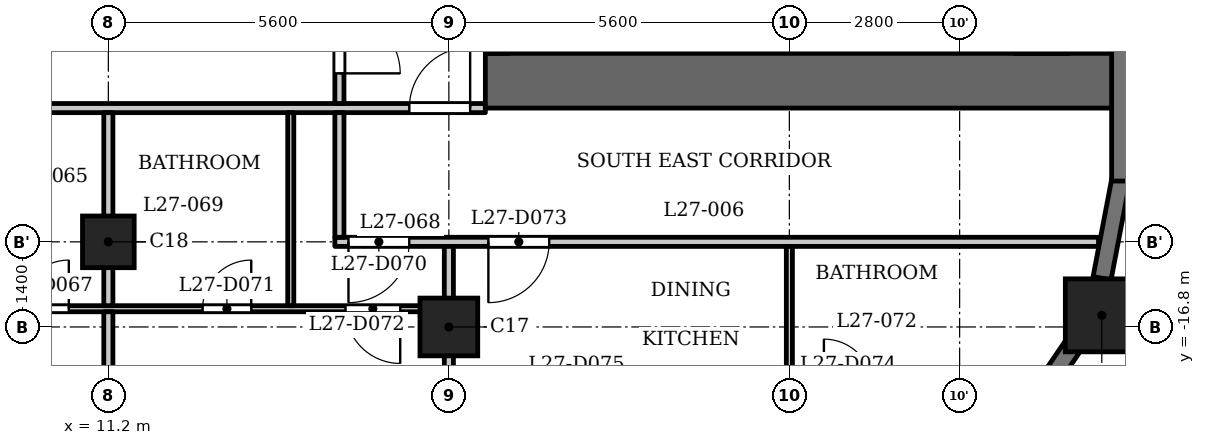
"""IFC4 building model, lengths in metres.
Left out: names, types, materials, properties, quantities, classifications, styles, units other than length and angle.
Written with IfcOpenShell. Run it as: python <this file> out.ifc"""

import sys

from ifc_helpers import new_model, si_unit, direction, frame, frame_2d, origin, origin_2d, place, context, subcontext, project, spatial, rectangle, extrude, element, fill, save


model = new_model("IFC4")
c1 = context("Model", 3, precision=1e-05, world=origin(), true_north=direction((0.0, 1.0)))
c2 = subcontext(c1, "Body", "Model", "MODEL_VIEW")
j1 = project(units=[si_unit("LENGTHUNIT", "METRE"), si_unit("PLANEANGLEUNIT", "RADIAN")], contexts=[c1])
p1 = place(None, origin())
s1 = spatial("IfcSite", under=j1, at=p1, CompositionType="ELEMENT")
p2 = place(p1, origin())
s2 = spatial("IfcBuilding", under=s1, at=p2, CompositionType="ELEMENT")
p3 = place(p2, frame((0.0, 0.0, 107.8)))
s3 = spatial("IfcBuildingStorey", under=s2, at=p3, CompositionType="ELEMENT", Elevation=107.8)
p4 = place(p3, frame((27.538, -16.609, 0.0), z_axis=(0.0, 0.0, 1.0), x_axis=(1.0, 0.0, 0.0)))
e1 = element("IfcColumn", 1, at=p4, inside=s3, PredefinedType="COLUMN", context=c2, shape_type="SweptSolid", body=[
    extrude(rectangle(XDim=1.2, YDim=1.2, at=origin_2d()), origin(), (0.0, 0.0, 1.0), 3.5),
])
p5 = place(p3, frame((16.8, -16.8, 0.0), z_axis=(0.0, 0.0, 1.0), x_axis=(1.0, 0.0, 0.0)))
e2 = element("IfcColumn", 2, at=p5, inside=s3, PredefinedType="COLUMN", context=c2, shape_type="SweptSolid", body=[
    extrude(rectangle(XDim=0.95, YDim=0.95, at=origin_2d()), origin(), (0.0, 0.0, 1.0), 3.5),
])
p6 = place(p3, frame((11.2, -15.4, 0.0), z_axis=(0.0, 0.0, 1.0), x_axis=(1.0, 0.0, 0.0)))
e3 = element("IfcColumn", 3, at=p6, inside=s3, PredefinedType="COLUMN", context=c2, shape_type="SweptSolid", body=[
    extrude(rectangle(XDim=0.85, YDim=0.85, at=origin_2d()), origin(), (0.0, 0.0, 1.0), 3.5),
])
p7 = place(p3, frame((26.561, -17.851, 0.0), z_axis=(0.0, 0.0, 1.0), x_axis=(0.562173331661, 0.827019434577, 0.0)))
e4 = element("IfcWall", 4, at=p7, inside=s3, PredefinedType="SOLIDWALL", context=c2, shape_type="SweptSolid", body=[
    extrude(rectangle(XDim=0.977, YDim=0.3, at=frame_2d((0.489, 0.0))), origin(), (0.0, 0.0, 1.0), 3.2),
])
p8 = place(p3, frame((27.542, -15.999, 0.0), z_axis=(0.0, 0.0, 1.0), x_axis=(0.187349172861, 0.982293381546, 0.0)))
e5 = element("IfcWall", 5, at=p8, inside=s3, PredefinedType="SOLIDWALL", context=c2, shape_type="SweptSolid", body=[
    extrude(rectangle(XDim=1.656, YDim=0.3, at=frame_2d((0.828, 0.0))), origin(), (0.0, 0.0, 1.0), 2.4),
])
p9 = place(p3, frame((27.85, -14.4, 0.0), z_axis=(0.0, 0.0, 1.0), x_axis=(0.0, 1.0, 0.0)))
e6 = element("IfcWall", 6, at=p9, inside=s3, PredefinedType="SOLIDWALL", context=c2, shape_type="SweptSolid", body=[
    extrude(rectangle(XDim=2.6, YDim=0.3, at=frame_2d((1.3, 0.0))), origin(), (0.0, 0.0, 1.0), 2.4),
])
p10 = place(p3, frame((17.4, -12.75, 0.0), z_axis=(0.0, 0.0, 1.0), x_axis=(1.0, 0.0, 0.0)))
e7 = element("IfcWall", 7, at=p10, inside=s3, PredefinedType="SHEAR", context=c2, shape_type="SweptSolid", body=[
    extrude(rectangle(XDim=10.4, YDim=0.9, at=frame_2d((5.2, 0.0))), origin(), (0.0, 0.0, 1.0), 3.2),
])
p11 = place(p3, frame((17.6, -12.3, 0.0), z_axis=(0.0, 0.0, 1.0), x_axis=(0.0, 1.0, 0.0)))
e8 = element("IfcWall", 8, at=p11, inside=s3, PredefinedType="SHEAR", context=c2, shape_type="SweptSolid", body=[
    extrude(rectangle(XDim=24.6, YDim=0.4, at=frame_2d((12.3, 0.0))), origin(), (0.0, 0.0, 1.0), 3.2),
])
p12 = place(p11, frame((6.0, 0.0, 0.0)))
e9 = element("IfcOpeningElement", 9, at=p12, cuts=e8, PredefinedType="OPENING", context=c2, shape_type="SweptSolid", body=[
    extrude(rectangle(XDim=1.1, YDim=2.1, at=frame_2d((0.55, 1.05))), frame((0.0, 0.21, 0.0), z_axis=(0.0, -1.0, 0.0), x_axis=(1.0, 0.0, 0.0)), (0.0, 0.0, 1.0), 0.42),
])
p13 = place(p11, frame((8.4, 0.0, 0.0)))
e10 = element("IfcOpeningElement", 10, at=p13, cuts=e8, PredefinedType="OPENING", context=c2, shape_type="SweptSolid", body=[
    extrude(rectangle(XDim=1.1, YDim=2.1, at=frame_2d((0.55, 1.05))), frame((0.0, 0.21, 0.0), z_axis=(0.0, -1.0, 0.0), x_axis=(1.0, 0.0, 0.0)), (0.0, 0.0, 1.0), 0.42),
])
p14 = place(p11, frame((10.8, 0.0, 0.0)))
e11 = element("IfcOpeningElement", 11, at=p14, cuts=e8, PredefinedType="OPENING", context=c2, shape_type="SweptSolid", body=[
    extrude(rectangle(XDim=1.1, YDim=2.1, at=frame_2d((0.55, 1.05))), frame((0.0, 0.21, 0.0), z_axis=(0.0, -1.0, 0.0), x_axis=(1.0, 0.0, 0.0)), (0.0, 0.0, 1.0), 0.42),
])
p15 = place(p11, frame((16.75, 0.0, 0.0)))
e12 = element("IfcOpeningElement", 12, at=p15, cuts=e8, PredefinedType="OPENING", context=c2, shape_type="SweptSolid", body=[
    extrude(rectangle(XDim=0.9, YDim=2.1, at=frame_2d((0.45, 1.05))), frame((0.0, 0.21, 0.0), z_axis=(0.0, -1.0, 0.0), x_axis=(1.0, 0.0, 0.0)), (0.0, 0.0, 1.0), 0.42),
])
p16 = place(p11, frame((22.8, 0.0, 0.0)))
e13 = element("IfcOpeningElement", 13, at=p16, cuts=e8, PredefinedType="OPENING", context=c2, shape_type="SweptSolid", body=[
    extrude(rectangle(XDim=1.1, YDim=2.1, at=frame_2d((0.55, 1.05))), frame((0.0, 0.21, 0.0), z_axis=(0.0, -1.0, 0.0), x_axis=(1.0, 0.0, 0.0)), (0.0, 0.0, 1.0), 0.42),
])
p17 = place(p11, frame((0.7, 0.0, 0.0)))
e14 = element("IfcOpeningElement", 14, at=p17, cuts=e8, PredefinedType="OPENING", context=c2, shape_type="SweptSolid", body=[
    extrude(rectangle(XDim=1.1, YDim=2.1, at=frame_2d((0.55, 1.05))), frame((0.0, 0.21, 0.0), z_axis=(0.0, -1.0, 0.0), x_axis=(1.0, 0.0, 0.0)), (0.0, 0.0, 1.0), 0.42),
])
p18 = place(p11, frame((12.775, 0.0, 0.0)))
e15 = element("IfcOpeningElement", 15, at=p18, cuts=e8, PredefinedType="OPENING", context=c2, shape_type="SweptSolid", body=[
    extrude(rectangle(XDim=1.8, YDim=2.1, at=frame_2d((0.9, 1.05))), frame((0.0, 0.21, 0.0), z_axis=(0.0, -1.0, 0.0), x_axis=(1.0, 0.0, 0.0)), (0.0, 0.0, 1.0), 0.42),
])
p19 = place(p3, frame((26.55, -12.3, 0.0), z_axis=(0.0, 0.0, 1.0), x_axis=(0.0, 1.0, 0.0)))
e16 = element("IfcWall", 16, at=p19, inside=s3, PredefinedType="SHEAR", context=c2, shape_type="SweptSolid", body=[
    extrude(rectangle(XDim=24.6, YDim=0.9, at=frame_2d((12.3, 0.0))), origin(), (0.0, 0.0, 1.0), 3.2),
])
p20 = place(p3, frame((23.55, -12.3, 0.0), z_axis=(0.0, 0.0, 1.0), x_axis=(0.0, 1.0, 0.0)))
e17 = element("IfcWall", 17, at=p20, inside=s3, PredefinedType="PARTITIONING", context=c2, shape_type="SweptSolid", body=[
    extrude(rectangle(XDim=2.5, YDim=0.2, at=frame_2d((1.25, 0.0))), origin(), (0.0, 0.0, 1.0), 3.2),
])
p21 = place(p20, frame((0.8, 0.0, 0.0)))
e18 = element("IfcOpeningElement", 18, at=p21, cuts=e17, PredefinedType="OPENING", context=c2, shape_type="SweptSolid", body=[
    extrude(rectangle(XDim=0.9, YDim=2.1, at=frame_2d((0.45, 1.05))), frame((0.0, 0.11, 0.0), z_axis=(0.0, -1.0, 0.0), x_axis=(1.0, 0.0, 0.0)), (0.0, 0.0, 1.0), 0.22),
])
p22 = place(p3, frame((-16.725, -16.5, 0.0), z_axis=(0.0, 0.0, 1.0), x_axis=(1.0, 0.0, 0.0)))
e19 = element("IfcWall", 19, at=p22, inside=s3, PredefinedType="PARTITIONING", context=c2, shape_type="SweptSolid", body=[
    extrude(rectangle(XDim=33.45, YDim=0.1, at=frame_2d((16.725, 0.0))), origin(), (0.0, 0.0, 1.0), 3.2),
])
p23 = place(p22, frame((4.075, 0.0, 0.0)))
e20 = element("IfcOpeningElement", 20, at=p23, cuts=e19, PredefinedType="OPENING", context=c2, shape_type="SweptSolid", body=[
    extrude(rectangle(XDim=0.8, YDim=2.1, at=frame_2d((0.4, 1.05))), frame((0.0, 0.06, 0.0), z_axis=(0.0, -1.0, 0.0), x_axis=(1.0, 0.0, 0.0)), (0.0, 0.0, 1.0), 0.12),
])
p24 = place(p22, frame((1.075, 0.0, 0.0)))
e21 = element("IfcOpeningElement", 21, at=p24, cuts=e19, PredefinedType="OPENING", context=c2, shape_type="SweptSolid", body=[
    extrude(rectangle(XDim=0.9, YDim=2.1, at=frame_2d((0.45, 1.05))), frame((0.0, 0.06, 0.0), z_axis=(0.0, -1.0, 0.0), x_axis=(1.0, 0.0, 0.0)), (0.0, 0.0, 1.0), 0.12),
])
p25 = place(p22, frame((9.675, 0.0, 0.0)))
e22 = element("IfcOpeningElement", 22, at=p25, cuts=e19, PredefinedType="OPENING", context=c2, shape_type="SweptSolid", body=[
    extrude(rectangle(XDim=0.8, YDim=2.1, at=frame_2d((0.4, 1.05))), frame((0.0, 0.06, 0.0), z_axis=(0.0, -1.0, 0.0), x_axis=(1.0, 0.0, 0.0)), (0.0, 0.0, 1.0), 0.12),
])
p26 = place(p22, frame((7.675, 0.0, 0.0)))
e23 = element("IfcOpeningElement", 23, at=p26, cuts=e19, PredefinedType="OPENING", context=c2, shape_type="SweptSolid", body=[
    extrude(rectangle(XDim=0.9, YDim=2.1, at=frame_2d((0.45, 1.05))), frame((0.0, 0.06, 0.0), z_axis=(0.0, -1.0, 0.0), x_axis=(1.0, 0.0, 0.0)), (0.0, 0.0, 1.0), 0.12),
])
p27 = place(p22, frame((15.275, 0.0, 0.0)))
e24 = element("IfcOpeningElement", 24, at=p27, cuts=e19, PredefinedType="OPENING", context=c2, shape_type="SweptSolid", body=[
    extrude(rectangle(XDim=0.8, YDim=2.1, at=frame_2d((0.4, 1.05))), frame((0.0, 0.06, 0.0), z_axis=(0.0, -1.0, 0.0), x_axis=(1.0, 0.0, 0.0)), (0.0, 0.0, 1.0), 0.12),
])
p28 = place(p22, frame((11.775, 0.0, 0.0)))
e25 = element("IfcOpeningElement", 25, at=p28, cuts=e19, PredefinedType="OPENING", context=c2, shape_type="SweptSolid", body=[
    extrude(rectangle(XDim=0.9, YDim=2.1, at=frame_2d((0.45, 1.05))), frame((0.0, 0.06, 0.0), z_axis=(0.0, -1.0, 0.0), x_axis=(1.0, 0.0, 0.0)), (0.0, 0.0, 1.0), 0.12),
])
p29 = place(p22, frame((20.625, 0.0, 0.0)))
e26 = element("IfcOpeningElement", 26, at=p29, cuts=e19, PredefinedType="OPENING", context=c2, shape_type="SweptSolid", body=[
    extrude(rectangle(XDim=0.8, YDim=2.1, at=frame_2d((0.4, 1.05))), frame((0.0, 0.06, 0.0), z_axis=(0.0, -1.0, 0.0), x_axis=(1.0, 0.0, 0.0)), (0.0, 0.0, 1.0), 0.12),
])
p30 = place(p22, frame((18.375, 0.0, 0.0)))
e27 = element("IfcOpeningElement", 27, at=p30, cuts=e19, PredefinedType="OPENING", context=c2, shape_type="SweptSolid", body=[
    extrude(rectangle(XDim=0.9, YDim=2.1, at=frame_2d((0.45, 1.05))), frame((0.0, 0.06, 0.0), z_axis=(0.0, -1.0, 0.0), x_axis=(1.0, 0.0, 0.0)), (0.0, 0.0, 1.0), 0.12),
])
p31 = place(p22, frame((26.475, 0.0, 0.0)))
e28 = element("IfcOpeningElement", 28, at=p31, cuts=e19, PredefinedType="OPENING", context=c2, shape_type="SweptSolid", body=[
    extrude(rectangle(XDim=0.8, YDim=2.1, at=frame_2d((0.4, 1.05))), frame((0.0, 0.06, 0.0), z_axis=(0.0, -1.0, 0.0), x_axis=(1.0, 0.0, 0.0)), (0.0, 0.0, 1.0), 0.12),
])
p32 = place(p22, frame((23.225, 0.0, 0.0)))
e29 = element("IfcOpeningElement", 29, at=p32, cuts=e19, PredefinedType="OPENING", context=c2, shape_type="SweptSolid", body=[
    extrude(rectangle(XDim=0.9, YDim=2.1, at=frame_2d((0.45, 1.05))), frame((0.0, 0.06, 0.0), z_axis=(0.0, -1.0, 0.0), x_axis=(1.0, 0.0, 0.0)), (0.0, 0.0, 1.0), 0.12),
])
p33 = place(p22, frame((29.475, 0.0, 0.0)))
e30 = element("IfcOpeningElement", 30, at=p33, cuts=e19, PredefinedType="OPENING", context=c2, shape_type="SweptSolid", body=[
    extrude(rectangle(XDim=0.8, YDim=2.1, at=frame_2d((0.4, 1.05))), frame((0.0, 0.06, 0.0), z_axis=(0.0, -1.0, 0.0), x_axis=(1.0, 0.0, 0.0)), (0.0, 0.0, 1.0), 0.12),
])
p34 = place(p22, frame((31.825, 0.0, 0.0)))
e31 = element("IfcOpeningElement", 31, at=p34, cuts=e19, PredefinedType="OPENING", context=c2, shape_type="SweptSolid", body=[
    extrude(rectangle(XDim=0.9, YDim=2.1, at=frame_2d((0.45, 1.05))), frame((0.0, 0.06, 0.0), z_axis=(0.0, -1.0, 0.0), x_axis=(1.0, 0.0, 0.0)), (0.0, 0.0, 1.0), 0.12),
])
p35 = place(p3, frame((14.925, -15.4, 0.0), z_axis=(0.0, 0.0, 1.0), x_axis=(1.0, 0.0, 0.0)))
e32 = element("IfcWall", 32, at=p35, inside=s3, PredefinedType="PARTITIONING", context=c2, shape_type="SweptSolid", body=[
    extrude(rectangle(XDim=12.559, YDim=0.15, at=frame_2d((6.279, 0.0))), origin(), (0.0, 0.0, 1.0), 3.2),
])
p36 = place(p35, frame((0.224, 0.0, 0.0)))
e33 = element("IfcOpeningElement", 33, at=p36, cuts=e32, PredefinedType="OPENING", context=c2, shape_type="SweptSolid", body=[
    extrude(rectangle(XDim=1.0, YDim=2.1, at=frame_2d((0.5, 1.05))), frame((0.0, 0.085, 0.0), z_axis=(0.0, -1.0, 0.0), x_axis=(1.0, 0.0, 0.0)), (0.0, 0.0, 1.0), 0.17),
])
p37 = place(p35, frame((2.525, 0.0, 0.0)))
e34 = element("IfcOpeningElement", 34, at=p37, cuts=e32, PredefinedType="OPENING", context=c2, shape_type="SweptSolid", body=[
    extrude(rectangle(XDim=1.0, YDim=2.1, at=frame_2d((0.5, 1.05))), frame((0.0, 0.085, 0.0), z_axis=(0.0, -1.0, 0.0), x_axis=(1.0, 0.0, 0.0)), (0.0, 0.0, 1.0), 0.17),
])
p38 = place(p3, frame((-17.4, -13.2, 0.0), z_axis=(0.0, 0.0, 1.0), x_axis=(1.0, 0.0, 0.0)))
e35 = element("IfcWall", 35, at=p38, inside=s3, PredefinedType="PARTITIONING", context=c2, shape_type="SweptSolid", body=[
    extrude(rectangle(XDim=34.8, YDim=0.15, at=frame_2d((17.4, 0.0))), origin(), (0.0, 0.0, 1.0), 3.2),
])
p39 = place(p38, frame((0.15, 0.0, 0.0)))
e36 = element("IfcOpeningElement", 36, at=p39, cuts=e35, PredefinedType="OPENING", context=c2, shape_type="SweptSolid", body=[
    extrude(rectangle(XDim=1.0, YDim=2.1, at=frame_2d((0.5, 1.05))), frame((0.0, 0.085, 0.0), z_axis=(0.0, -1.0, 0.0), x_axis=(1.0, 0.0, 0.0)), (0.0, 0.0, 1.0), 0.17),
])
p40 = place(p38, frame((33.55, 0.0, 0.0)))
e37 = element("IfcOpeningElement", 37, at=p40, cuts=e35, PredefinedType="OPENING", context=c2, shape_type="SweptSolid", body=[
    extrude(rectangle(XDim=1.0, YDim=2.1, at=frame_2d((0.5, 1.05))), frame((0.0, 0.085, 0.0), z_axis=(0.0, -1.0, 0.0), x_axis=(1.0, 0.0, 0.0)), (0.0, 0.0, 1.0), 0.17),
])
p41 = place(p38, frame((8.1, 0.0, 0.0)))
e38 = element("IfcOpeningElement", 38, at=p41, cuts=e35, PredefinedType="OPENING", context=c2, shape_type="SweptSolid", body=[
    extrude(rectangle(XDim=1.0, YDim=2.1, at=frame_2d((0.5, 1.05))), frame((0.0, 0.085, 0.0), z_axis=(0.0, -1.0, 0.0), x_axis=(1.0, 0.0, 0.0)), (0.0, 0.0, 1.0), 0.17),
])
p42 = place(p38, frame((12.45, 0.0, 0.0)))
e39 = element("IfcOpeningElement", 39, at=p42, cuts=e35, PredefinedType="OPENING", context=c2, shape_type="SweptSolid", body=[
    extrude(rectangle(XDim=1.0, YDim=2.1, at=frame_2d((0.5, 1.05))), frame((0.0, 0.085, 0.0), z_axis=(0.0, -1.0, 0.0), x_axis=(1.0, 0.0, 0.0)), (0.0, 0.0, 1.0), 0.17),
])
p43 = place(p38, frame((19.05, 0.0, 0.0)))
e40 = element("IfcOpeningElement", 40, at=p43, cuts=e35, PredefinedType="OPENING", context=c2, shape_type="SweptSolid", body=[
    extrude(rectangle(XDim=1.0, YDim=2.1, at=frame_2d((0.5, 1.05))), frame((0.0, 0.085, 0.0), z_axis=(0.0, -1.0, 0.0), x_axis=(1.0, 0.0, 0.0)), (0.0, 0.0, 1.0), 0.17),
])
p44 = place(p38, frame((24.9, 0.0, 0.0)))
e41 = element("IfcOpeningElement", 41, at=p44, cuts=e35, PredefinedType="OPENING", context=c2, shape_type="SweptSolid", body=[
    extrude(rectangle(XDim=1.0, YDim=2.1, at=frame_2d((0.5, 1.05))), frame((0.0, 0.085, 0.0), z_axis=(0.0, -1.0, 0.0), x_axis=(1.0, 0.0, 0.0)), (0.0, 0.0, 1.0), 0.17),
])
p45 = place(p3, frame((11.2, -22.98, 0.0), z_axis=(0.0, 0.0, 1.0), x_axis=(0.0, 1.0, 0.0)))
e42 = element("IfcWall", 42, at=p45, inside=s3, PredefinedType="PARTITIONING", context=c2, shape_type="SweptSolid", body=[
    extrude(rectangle(XDim=6.43, YDim=0.15, at=frame_2d((3.215, 0.0))), origin(), (0.0, 0.0, 1.0), 3.2),
])
p46 = place(p3, frame((11.2, -16.45, 0.0), z_axis=(0.0, 0.0, 1.0), x_axis=(0.0, 1.0, 0.0)))
e43 = element("IfcWall", 43, at=p46, inside=s3, PredefinedType="PARTITIONING", context=c2, shape_type="SweptSolid", body=[
    extrude(rectangle(XDim=3.175, YDim=0.15, at=frame_2d((1.587, 0.0))), origin(), (0.0, 0.0, 1.0), 3.2),
])
p47 = place(p3, frame((14.2, -16.45, 0.0), z_axis=(0.0, 0.0, 1.0), x_axis=(0.0, 1.0, 0.0)))
e44 = element("IfcWall", 44, at=p47, inside=s3, PredefinedType="PARTITIONING", context=c2, shape_type="SweptSolid", body=[
    extrude(rectangle(XDim=3.175, YDim=0.1, at=frame_2d((1.587, 0.0))), origin(), (0.0, 0.0, 1.0), 3.2),
])
p48 = place(p3, frame((15.0, -15.325, 0.0), z_axis=(0.0, 0.0, 1.0), x_axis=(0.0, 1.0, 0.0)))
e45 = element("IfcWall", 45, at=p48, inside=s3, PredefinedType="PARTITIONING", context=c2, shape_type="SweptSolid", body=[
    extrude(rectangle(XDim=2.05, YDim=0.15, at=frame_2d((1.025, 0.0))), origin(), (0.0, 0.0, 1.0), 3.2),
])
p49 = place(p3, frame((15.0, -13.125, 0.0), z_axis=(0.0, 0.0, 1.0), x_axis=(0.0, 1.0, 0.0)))
e46 = element("IfcWall", 46, at=p49, inside=s3, PredefinedType="PARTITIONING", context=c2, shape_type="SweptSolid", body=[
    extrude(rectangle(XDim=6.356, YDim=0.15, at=frame_2d((3.178, 0.0))), origin(), (0.0, 0.0, 1.0), 3.2),
])
p50 = place(p49, frame((0.496, 0.0, 0.0)))
e47 = element("IfcOpeningElement", 47, at=p50, cuts=e46, PredefinedType="OPENING", context=c2, shape_type="SweptSolid", body=[
    extrude(rectangle(XDim=1.0, YDim=2.1, at=frame_2d((0.5, 1.05))), frame((0.0, 0.085, 0.0), z_axis=(0.0, -1.0, 0.0), x_axis=(1.0, 0.0, 0.0)), (0.0, 0.0, 1.0), 0.17),
])
p51 = place(p3, frame((16.8, -22.98, 0.0), z_axis=(0.0, 0.0, 1.0), x_axis=(0.0, 1.0, 0.0)))
e48 = element("IfcWall", 48, at=p51, inside=s3, PredefinedType="PARTITIONING", context=c2, shape_type="SweptSolid", body=[
    extrude(rectangle(XDim=7.505, YDim=0.15, at=frame_2d((3.752, 0.0))), origin(), (0.0, 0.0, 1.0), 3.2),
])
p52 = place(p3, frame((22.4, -17.75, 0.0), z_axis=(0.0, 0.0, 1.0), x_axis=(0.0, 1.0, 0.0)))
e49 = element("IfcWall", 49, at=p52, inside=s3, PredefinedType="PARTITIONING", context=c2, shape_type="SweptSolid", body=[
    extrude(rectangle(XDim=2.275, YDim=0.1, at=frame_2d((1.137, 0.0))), origin(), (0.0, 0.0, 1.0), 3.2),
])
p53 = place(p50, origin())
e50 = element("IfcDoor", 50, at=p53, inside=s3, OperationType="SINGLE_SWING_LEFT", PredefinedType="DOOR", context=c2, shape_type="SweptSolid", body=[
    extrude(rectangle(XDim=1.0, YDim=2.1, at=frame_2d((0.5, 1.05))), frame((0.0, 0.025, 0.0), z_axis=(0.0, -1.0, 0.0), x_axis=(1.0, 0.0, 0.0)), (0.0, 0.0, 1.0), 0.05),
])
fill(e47, e50)
p54 = place(p40, origin())
e51 = element("IfcDoor", 51, at=p54, inside=s3, OperationType="SINGLE_SWING_LEFT", PredefinedType="DOOR", context=c2, shape_type="SweptSolid", body=[
    extrude(rectangle(XDim=1.0, YDim=2.1, at=frame_2d((0.5, 1.05))), frame((0.0, 0.025, 0.0), z_axis=(0.0, -1.0, 0.0), x_axis=(1.0, 0.0, 0.0)), (0.0, 0.0, 1.0), 0.05),
])
fill(e37, e51)
p55 = place(p31, origin())
e52 = element("IfcDoor", 52, at=p55, inside=s3, OperationType="SINGLE_SWING_LEFT", PredefinedType="DOOR", context=c2, shape_type="SweptSolid", body=[
    extrude(rectangle(XDim=0.8, YDim=2.1, at=frame_2d((0.4, 1.05))), frame((0.0, 0.025, 0.0), z_axis=(0.0, -1.0, 0.0), x_axis=(1.0, 0.0, 0.0)), (0.0, 0.0, 1.0), 0.05),
])
fill(e28, e52)
p56 = place(p36, origin())
e53 = element("IfcDoor", 53, at=p56, inside=s3, OperationType="SINGLE_SWING_LEFT", PredefinedType="DOOR", context=c2, shape_type="SweptSolid", body=[
    extrude(rectangle(XDim=1.0, YDim=2.1, at=frame_2d((0.5, 1.05))), frame((0.0, 0.025, 0.0), z_axis=(0.0, -1.0, 0.0), x_axis=(1.0, 0.0, 0.0)), (0.0, 0.0, 1.0), 0.05),
])
fill(e33, e53)
p57 = place(p33, origin())
e54 = element("IfcDoor", 54, at=p57, inside=s3, OperationType="SINGLE_SWING_LEFT", PredefinedType="DOOR", context=c2, shape_type="SweptSolid", body=[
    extrude(rectangle(XDim=0.8, YDim=2.1, at=frame_2d((0.4, 1.05))), frame((0.0, 0.025, 0.0), z_axis=(0.0, -1.0, 0.0), x_axis=(1.0, 0.0, 0.0)), (0.0, 0.0, 1.0), 0.05),
])
fill(e30, e54)
p58 = place(p34, origin())
e55 = element("IfcDoor", 55, at=p58, inside=s3, OperationType="SINGLE_SWING_RIGHT", PredefinedType="DOOR", context=c2, shape_type="SweptSolid", body=[
    extrude(rectangle(XDim=0.9, YDim=2.1, at=frame_2d((0.45, 1.05))), frame((0.0, 0.025, 0.0), z_axis=(0.0, -1.0, 0.0), x_axis=(1.0, 0.0, 0.0)), (0.0, 0.0, 1.0), 0.05),
])
fill(e31, e55)
p59 = place(p37, origin())
e56 = element("IfcDoor", 56, at=p59, inside=s3, OperationType="SINGLE_SWING_LEFT", PredefinedType="DOOR", context=c2, shape_type="SweptSolid", body=[
    extrude(rectangle(XDim=1.0, YDim=2.1, at=frame_2d((0.5, 1.05))), frame((0.0, 0.025, 0.0), z_axis=(0.0, -1.0, 0.0), x_axis=(1.0, 0.0, 0.0)), (0.0, 0.0, 1.0), 0.05),
])
fill(e34, e56)
save(model, sys.argv[1])
